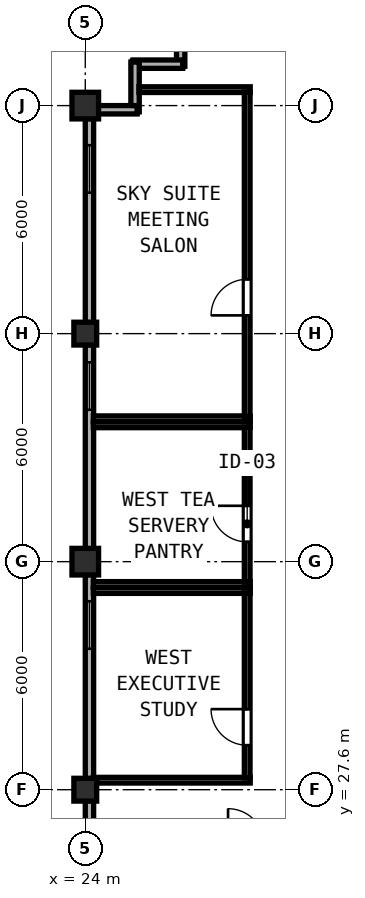
"""IFC4 building model, lengths in metres.
Left out: names, types, materials, properties, quantities, classifications, styles, units other than length and angle.
Written with IfcOpenShell. Run it as: python <this file> out.ifc"""

import sys

from ifc_helpers import new_model, si_unit, direction, frame, frame_2d, origin, origin_2d, place, context, subcontext, project, spatial, rectangle, hollow_rectangle, extrude, element, fill, save


model = new_model("IFC4")
c1 = context("Model", 3, precision=1e-05, world=origin(), true_north=direction((0.0, 1.0)))
c2 = subcontext(c1, "Body", "Model", "MODEL_VIEW")
j1 = project(units=[si_unit("LENGTHUNIT", "METRE"), si_unit("PLANEANGLEUNIT", "RADIAN")], contexts=[c1])
p1 = place(None, origin())
s1 = spatial("IfcSite", under=j1, at=p1, CompositionType="ELEMENT")
p2 = place(p1, origin())
s2 = spatial("IfcBuilding", under=s1, at=p2, CompositionType="ELEMENT")
p3 = place(p2, frame((0.0, 0.0, 293.9)))
s3 = spatial("IfcBuildingStorey", under=s2, at=p3, CompositionType="ELEMENT", Elevation=293.9)
for number, where, z_axis, x_axis in (
    (1, (24.0, 33.6, 0.0), (0.0, 0.0, 1.0), (1.0, 0.0, 0.0)),
    (2, (24.0, 45.6, 0.0), (0.0, 0.0, 1.0), (1.0, 0.0, 0.0)),
):
    element("IfcColumn", number, at=place(p3, frame(where, z_axis=z_axis, x_axis=x_axis)), inside=s3, PredefinedType="COLUMN", context=c2, shape_type="SweptSolid", body=[
        extrude(hollow_rectangle(XDim=0.7, YDim=0.7, WallThickness=0.026, at=origin_2d()), origin(), (0.0, 0.0, 1.0), 3.9),
    ])
for number, where, z_axis, x_axis in (
    (3, (24.0, 27.6, 0.0), (0.0, 0.0, 1.0), (1.0, 0.0, 0.0)),
    (4, (24.0, 39.6, 0.0), (0.0, 0.0, 1.0), (1.0, 0.0, 0.0)),
):
    element("IfcColumn", number, at=place(p3, frame(where, z_axis=z_axis, x_axis=x_axis)), inside=s3, PredefinedType="COLUMN", context=c2, shape_type="SweptSolid", body=[
        extrude(hollow_rectangle(XDim=0.6, YDim=0.6, WallThickness=0.024, at=origin_2d()), origin(), (0.0, 0.0, 1.0), 3.9),
    ])
p4 = place(p3, frame((26.51, 48.0, 0.0), z_axis=(0.0, 0.0, 1.0), x_axis=(0.0, -1.0, 0.0)))
e5 = element("IfcWall", 5, at=p4, inside=s3, PredefinedType="SOLIDWALL", context=c2, shape_type="SweptSolid", body=[
    extrude(rectangle(XDim=1.365, YDim=0.22, at=frame_2d((0.683, 0.0))), origin(), (0.0, 0.0, 1.0), 3.72),
])
for number, where, z_axis, x_axis in (
    (6, (26.565, 46.69, 0.0), (0.0, 0.0, 1.0), (-1.0, 0.0, 0.0)),
    (7, (25.31, 46.745, 0.0), (0.0, 0.0, 1.0), (0.0, -1.0, 0.0)),
):
    element("IfcWall", number, at=place(p3, frame(where, z_axis=z_axis, x_axis=x_axis)), inside=s3, PredefinedType="SOLIDWALL", context=c2, shape_type="SweptSolid", body=[
        extrude(rectangle(XDim=1.31, YDim=0.22, at=frame_2d((0.655, 0.0))), origin(), (0.0, 0.0, 1.0), 3.72),
    ])
p5 = place(p3, frame((25.365, 45.49, 0.0), z_axis=(0.0, 0.0, 1.0), x_axis=(-1.0, 0.0, 0.0)))
e8 = element("IfcWall", 8, at=p5, inside=s3, PredefinedType="SOLIDWALL", context=c2, shape_type="SweptSolid", body=[
    extrude(rectangle(XDim=1.023, YDim=0.22, at=frame_2d((0.511, 0.0))), origin(), (0.0, 0.0, 1.0), 3.72),
])
p6 = place(p3, frame((24.11, 45.258, 0.0), z_axis=(0.0, 0.0, 1.0), x_axis=(0.0, -1.0, 0.0)))
e9 = element("IfcWall", 9, at=p6, inside=s3, PredefinedType="SOLIDWALL", context=c2, shape_type="SweptSolid", body=[
    extrude(rectangle(XDim=5.366, YDim=0.22, at=frame_2d((2.683, 0.0))), origin(), (0.0, 0.0, 1.0), 3.365),
])
p7 = place(p6, frame((0.7, 0.0, 0.85)))
e10 = element("IfcOpeningElement", 10, at=p7, cuts=e9, PredefinedType="OPENING", context=c2, shape_type="SweptSolid", body=[
    extrude(rectangle(XDim=1.25, YDim=1.95, at=frame_2d((0.625, 0.975))), frame((0.0, 0.12, 0.0), z_axis=(0.0, -1.0, 0.0), x_axis=(1.0, 0.0, 0.0)), (0.0, 0.0, 1.0), 0.24),
])
p8 = place(p3, frame((24.11, 39.308, 0.0), z_axis=(0.0, 0.0, 1.0), x_axis=(0.0, -1.0, 0.0)))
e11 = element("IfcWall", 11, at=p8, inside=s3, PredefinedType="SOLIDWALL", context=c2, shape_type="SweptSolid", body=[
    extrude(rectangle(XDim=5.366, YDim=0.22, at=frame_2d((2.683, 0.0))), origin(), (0.0, 0.0, 1.0), 3.365),
])
p9 = place(p8, frame((0.463, 0.0, 0.85)))
e12 = element("IfcOpeningElement", 12, at=p9, cuts=e11, PredefinedType="OPENING", context=c2, shape_type="SweptSolid", body=[
    extrude(rectangle(XDim=1.25, YDim=1.95, at=frame_2d((0.625, 0.975))), frame((0.0, 0.12, 0.0), z_axis=(0.0, -1.0, 0.0), x_axis=(1.0, 0.0, 0.0)), (0.0, 0.0, 1.0), 0.24),
])
p10 = place(p3, frame((24.11, 33.258, 0.0), z_axis=(0.0, 0.0, 1.0), x_axis=(0.0, -1.0, 0.0)))
e13 = element("IfcWall", 13, at=p10, inside=s3, PredefinedType="SOLIDWALL", context=c2, shape_type="SweptSolid", body=[
    extrude(rectangle(XDim=5.366, YDim=0.22, at=frame_2d((2.683, 0.0))), origin(), (0.0, 0.0, 1.0), 3.365),
])
p11 = place(p10, frame((0.7, 0.0, 0.85)))
e14 = element("IfcOpeningElement", 14, at=p11, cuts=e13, PredefinedType="OPENING", context=c2, shape_type="SweptSolid", body=[
    extrude(rectangle(XDim=1.25, YDim=1.95, at=frame_2d((0.625, 0.975))), frame((0.0, 0.12, 0.0), z_axis=(0.0, -1.0, 0.0), x_axis=(1.0, 0.0, 0.0)), (0.0, 0.0, 1.0), 0.24),
])
p12 = place(p3, frame((24.11, 27.308, 0.0), z_axis=(0.0, 0.0, 1.0), x_axis=(0.0, -1.0, 0.0)))
e15 = element("IfcWall", 15, at=p12, inside=s3, PredefinedType="SOLIDWALL", context=c2, shape_type="SweptSolid", body=[
    extrude(rectangle(XDim=5.366, YDim=0.22, at=frame_2d((2.683, 0.0))), origin(), (0.0, 0.0, 1.0), 3.365),
])
p13 = place(p12, frame((1.393, 0.0, 0.85)))
e16 = element("IfcOpeningElement", 16, at=p13, cuts=e15, PredefinedType="OPENING", context=c2, shape_type="SweptSolid", body=[
    extrude(rectangle(XDim=1.25, YDim=1.95, at=frame_2d((0.625, 0.975))), frame((0.0, 0.12, 0.0), z_axis=(0.0, -1.0, 0.0), x_axis=(1.0, 0.0, 0.0)), (0.0, 0.0, 1.0), 0.24),
])
for number, where, z_axis, x_axis in (
    (17, (24.212, 37.2, 0.0), (0.0, 0.0, 1.0), (1.0, 0.0, 0.0)),
    (18, (24.212, 33.0, 0.0), (0.0, 0.0, 1.0), (1.0, 0.0, 0.0)),
):
    element("IfcWall", number, at=place(p3, frame(where, z_axis=z_axis, x_axis=x_axis)), inside=s3, PredefinedType="PARTITIONING", context=c2, shape_type="SweptSolid", body=[
        extrude(rectangle(XDim=4.128, YDim=0.15, at=frame_2d((2.064, 0.0))), origin(), (0.0, 0.0, 1.0), 3.72),
    ])
p14 = place(p3, frame((28.26, 33.06, 0.0), z_axis=(0.0, 0.0, 1.0), x_axis=(0.0, 1.0, 0.0)))
e19 = element("IfcWall", 19, at=p14, inside=s3, PredefinedType="PARTITIONING", context=c2, shape_type="SweptSolid", body=[
    extrude(rectangle(XDim=4.08, YDim=0.15, at=frame_2d((2.04, 0.0))), origin(), (0.0, 0.0, 1.0), 3.72),
])
p15 = place(p14, frame((2.01, 0.0, 0.0), z_axis=(0.0, 0.0, 1.0), x_axis=(-1.0, 0.0, 0.0)))
e20 = element("IfcOpeningElement", 20, at=p15, cuts=e19, PredefinedType="OPENING", context=c2, shape_type="SweptSolid", body=[
    extrude(rectangle(XDim=0.95, YDim=2.12, at=frame_2d((0.475, 1.06))), frame((0.0, 0.085, 0.0), z_axis=(0.0, -1.0, 0.0), x_axis=(1.0, 0.0, 0.0)), (0.0, 0.0, 1.0), 0.17),
])
p16 = place(p3, frame((25.412, 46.02, 0.0), z_axis=(0.0, 0.0, 1.0), x_axis=(1.0, 0.0, 0.0)))
e21 = element("IfcWall", 21, at=p16, inside=s3, PredefinedType="PARTITIONING", context=c2, shape_type="SweptSolid", body=[
    extrude(rectangle(XDim=2.928, YDim=0.15, at=frame_2d((1.464, 0.0))), origin(), (0.0, 0.0, 1.0), 3.72),
])
p17 = place(p3, frame((24.212, 37.36, 0.0), z_axis=(0.0, 0.0, 1.0), x_axis=(1.0, 0.0, 0.0)))
e22 = element("IfcWall", 22, at=p17, inside=s3, PredefinedType="PARTITIONING", context=c2, shape_type="SweptSolid", body=[
    extrude(rectangle(XDim=4.128, YDim=0.15, at=frame_2d((2.064, 0.0))), origin(), (0.0, 0.0, 1.0), 3.72),
])
p18 = place(p3, frame((28.26, 37.42, 0.0), z_axis=(0.0, 0.0, 1.0), x_axis=(0.0, 1.0, 0.0)))
e23 = element("IfcWall", 23, at=p18, inside=s3, PredefinedType="PARTITIONING", context=c2, shape_type="SweptSolid", body=[
    extrude(rectangle(XDim=8.54, YDim=0.15, at=frame_2d((4.27, 0.0))), origin(), (0.0, 0.0, 1.0), 3.72),
])
p19 = place(p18, frame((3.61, 0.0, 0.0), z_axis=(0.0, 0.0, 1.0), x_axis=(-1.0, 0.0, 0.0)))
e24 = element("IfcOpeningElement", 24, at=p19, cuts=e23, PredefinedType="OPENING", context=c2, shape_type="SweptSolid", body=[
    extrude(rectangle(XDim=0.95, YDim=2.12, at=frame_2d((0.475, 1.06))), frame((0.0, 0.085, 0.0), z_axis=(0.0, -1.0, 0.0), x_axis=(1.0, 0.0, 0.0)), (0.0, 0.0, 1.0), 0.17),
])
for number, where, z_axis, x_axis in (
    (25, (24.212, 32.84, 0.0), (0.0, 0.0, 1.0), (1.0, 0.0, 0.0)),
    (26, (24.212, 27.85, 0.0), (0.0, 0.0, 1.0), (1.0, 0.0, 0.0)),
):
    element("IfcWall", number, at=place(p3, frame(where, z_axis=z_axis, x_axis=x_axis)), inside=s3, PredefinedType="PARTITIONING", context=c2, shape_type="SweptSolid", body=[
        extrude(rectangle(XDim=4.128, YDim=0.15, at=frame_2d((2.064, 0.0))), origin(), (0.0, 0.0, 1.0), 3.72),
    ])
p20 = place(p3, frame((28.26, 27.91, 0.0), z_axis=(0.0, 0.0, 1.0), x_axis=(0.0, 1.0, 0.0)))
e27 = element("IfcWall", 27, at=p20, inside=s3, PredefinedType="PARTITIONING", context=c2, shape_type="SweptSolid", body=[
    extrude(rectangle(XDim=4.87, YDim=0.15, at=frame_2d((2.435, 0.0))), origin(), (0.0, 0.0, 1.0), 3.72),
])
p21 = place(p20, frame((1.81, 0.0, 0.0), z_axis=(0.0, 0.0, 1.0), x_axis=(-1.0, 0.0, 0.0)))
e28 = element("IfcOpeningElement", 28, at=p21, cuts=e27, PredefinedType="OPENING", context=c2, shape_type="SweptSolid", body=[
    extrude(rectangle(XDim=0.95, YDim=2.12, at=frame_2d((0.475, 1.06))), frame((0.0, 0.085, 0.0), z_axis=(0.0, -1.0, 0.0), x_axis=(1.0, 0.0, 0.0)), (0.0, 0.0, 1.0), 0.17),
])
p22 = place(p7, origin())
e29 = element("IfcWindow", 29, at=p22, inside=s3, PartitioningType="SINGLE_PANEL", PredefinedType="WINDOW", context=c2, shape_type="SweptSolid", body=[
    extrude(rectangle(XDim=1.25, YDim=1.95, at=frame_2d((0.625, 0.975))), frame((0.0, 0.03, 0.0), z_axis=(0.0, -1.0, 0.0), x_axis=(1.0, 0.0, 0.0)), (0.0, 0.0, 1.0), 0.06),
])
fill(e10, e29)
p23 = place(p9, origin())
e30 = element("IfcWindow", 30, at=p23, inside=s3, PartitioningType="SINGLE_PANEL", PredefinedType="WINDOW", context=c2, shape_type="SweptSolid", body=[
    extrude(rectangle(XDim=1.25, YDim=1.95, at=frame_2d((0.625, 0.975))), frame((0.0, 0.03, 0.0), z_axis=(0.0, -1.0, 0.0), x_axis=(1.0, 0.0, 0.0)), (0.0, 0.0, 1.0), 0.06),
])
fill(e12, e30)
p24 = place(p11, origin())
e31 = element("IfcWindow", 31, at=p24, inside=s3, PartitioningType="SINGLE_PANEL", PredefinedType="WINDOW", context=c2, shape_type="SweptSolid", body=[
    extrude(rectangle(XDim=1.25, YDim=1.95, at=frame_2d((0.625, 0.975))), frame((0.0, 0.03, 0.0), z_axis=(0.0, -1.0, 0.0), x_axis=(1.0, 0.0, 0.0)), (0.0, 0.0, 1.0), 0.06),
])
fill(e14, e31)
p25 = place(p15, origin())
e32 = element("IfcDoor", 32, at=p25, inside=s3, OperationType="SINGLE_SWING_LEFT", PredefinedType="DOOR", context=c2, shape_type="SweptSolid", body=[
    extrude(rectangle(XDim=0.95, YDim=2.12, at=frame_2d((0.475, 1.06))), frame((0.0, 0.025, 0.0), z_axis=(0.0, -1.0, 0.0), x_axis=(1.0, 0.0, 0.0)), (0.0, 0.0, 1.0), 0.05),
])
fill(e20, e32)
p26 = place(p19, origin())
e33 = element("IfcDoor", 33, at=p26, inside=s3, OperationType="SINGLE_SWING_RIGHT", PredefinedType="DOOR", context=c2, shape_type="SweptSolid", body=[
    extrude(rectangle(XDim=0.95, YDim=2.12, at=frame_2d((0.475, 1.06))), frame((0.0, 0.025, 0.0), z_axis=(0.0, -1.0, 0.0), x_axis=(1.0, 0.0, 0.0)), (0.0, 0.0, 1.0), 0.05),
])
fill(e24, e33)
p27 = place(p21, origin())
e34 = element("IfcDoor", 34, at=p27, inside=s3, OperationType="SINGLE_SWING_LEFT", PredefinedType="DOOR", context=c2, shape_type="SweptSolid", body=[
    extrude(rectangle(XDim=0.95, YDim=2.12, at=frame_2d((0.475, 1.06))), frame((0.0, 0.025, 0.0), z_axis=(0.0, -1.0, 0.0), x_axis=(1.0, 0.0, 0.0)), (0.0, 0.0, 1.0), 0.05),
])
fill(e28, e34)
save(model, sys.argv[1])
